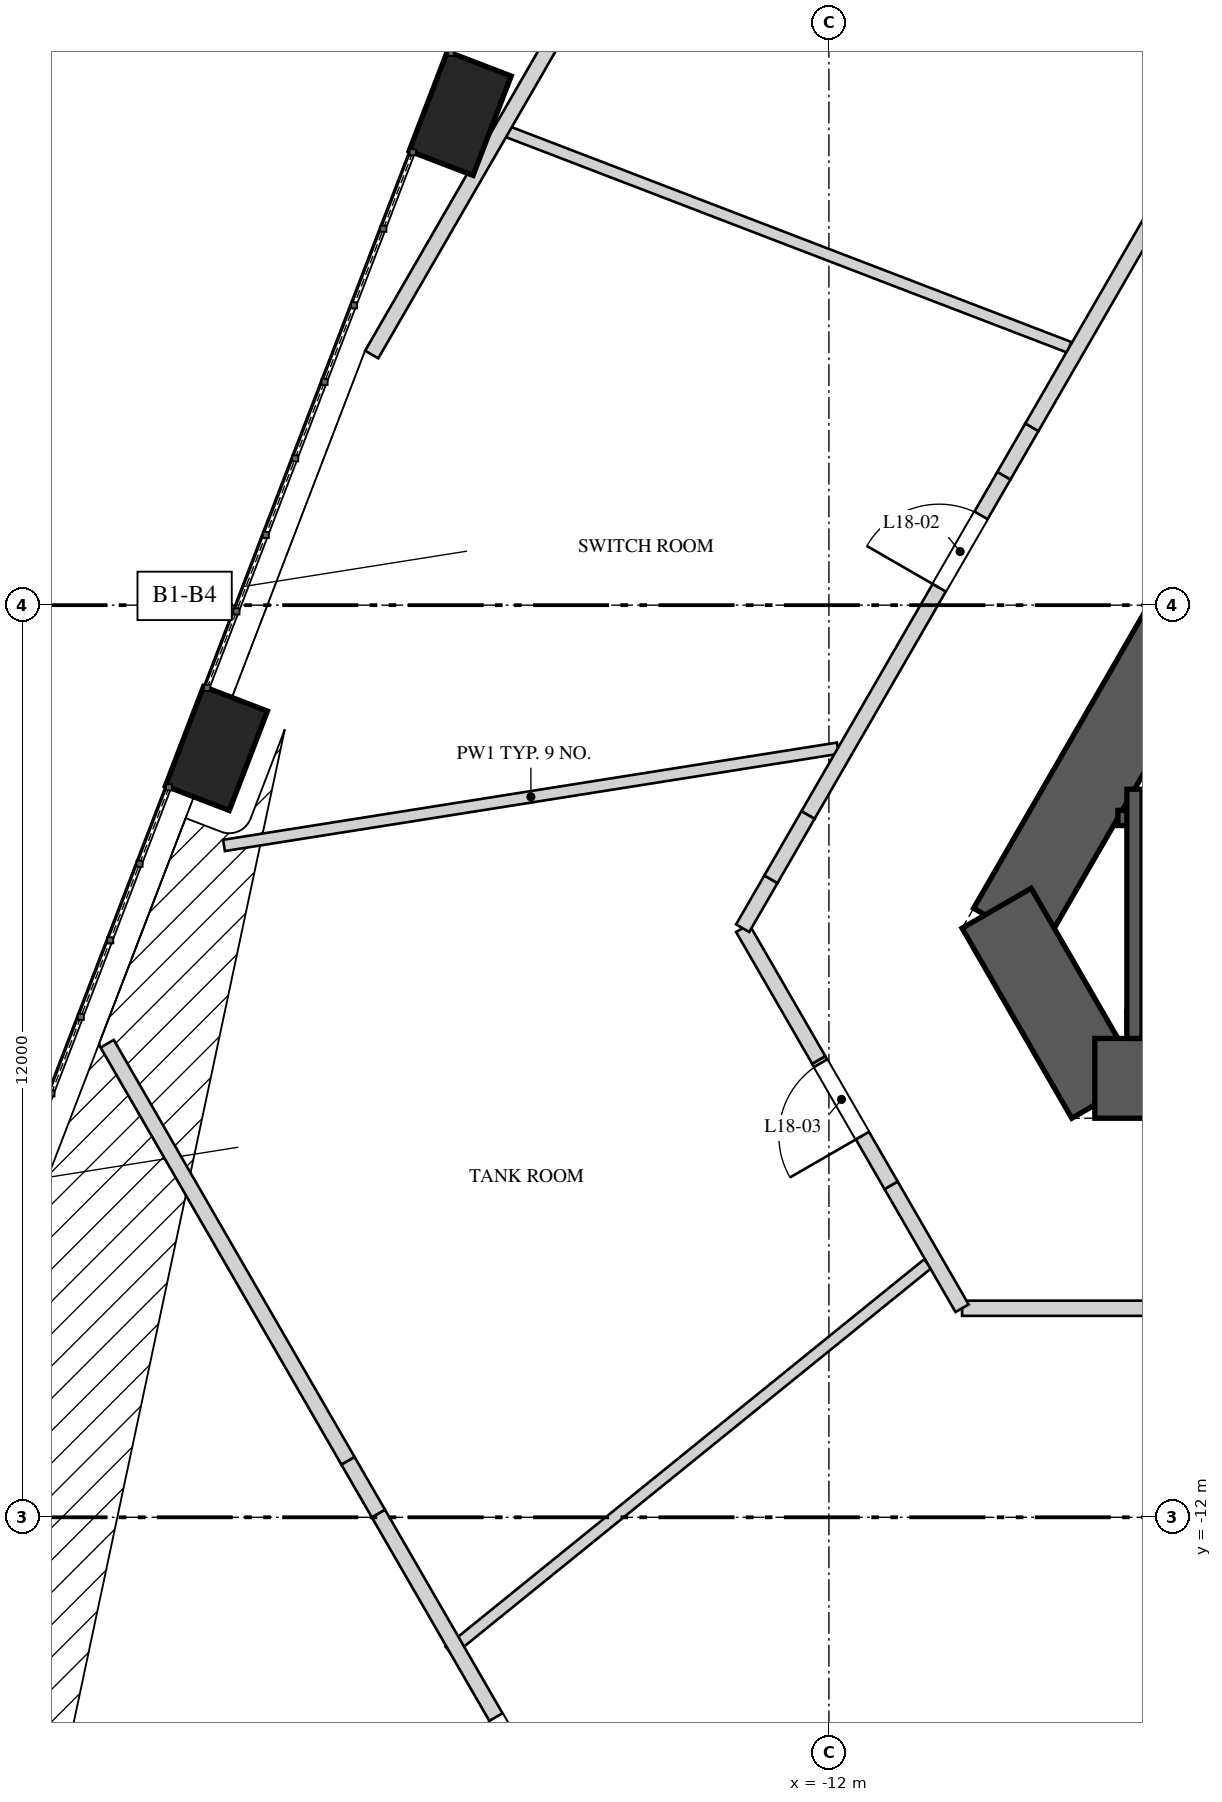
"""IFC4 building model, lengths in metres.
Left out: names, types, materials, properties, quantities, classifications, styles, units other than length and angle.
Written with IfcOpenShell. Run it as: python <this file> out.ifc"""

import sys

from ifc_helpers import new_model, si_unit, direction, frame, frame_2d, origin, origin_2d, place, context, subcontext, project, spatial, polyline, rectangle, outline, extrude, element, fill, save


model = new_model("IFC4")
c1 = context("Model", 3, precision=1e-05, world=origin(), true_north=direction((0.0, 1.0)))
c2 = subcontext(c1, "Body", "Model", "MODEL_VIEW")
j1 = project(units=[si_unit("LENGTHUNIT", "METRE"), si_unit("PLANEANGLEUNIT", "RADIAN")], contexts=[c1])
p1 = place(None, origin())
s1 = spatial("IfcSite", under=j1, at=p1, CompositionType="ELEMENT")
p2 = place(p1, origin())
s2 = spatial("IfcBuilding", under=s1, at=p2, CompositionType="ELEMENT")
p3 = place(p2, frame((0.0, 0.0, 83.2)))
s3 = spatial("IfcBuildingStorey", under=s2, at=p3, CompositionType="ELEMENT", Elevation=83.2)
p4 = place(p3, frame((-1.14, 10.475, 0.0), z_axis=(0.0, 0.0, 1.0), x_axis=(-0.499985955615, -0.866033512162, 0.0)))
e1 = element("IfcWall", 1, at=p4, inside=s3, PredefinedType="SHEAR", context=c2, shape_type="SweptSolid", body=[
    extrude(rectangle(XDim=17.003, YDim=1.05, at=frame_2d((8.501, 0.0))), origin(), (0.0, 0.0, 1.0), 5.2),
])
p5 = place(p4, frame((6.707, 0.0, 0.0)))
e2 = element("IfcOpeningElement", 2, at=p5, cuts=e1, PredefinedType="OPENING", context=c2, shape_type="SweptSolid", body=[
    extrude(rectangle(XDim=1.0, YDim=2.4, at=frame_2d((0.5, 1.2))), frame((0.0, 0.535, 0.0), z_axis=(0.0, -1.0, 0.0), x_axis=(1.0, 0.0, 0.0)), (0.0, 0.0, 1.0), 1.07),
])
p6 = place(p3, frame((-9.793, -3.988, 0.0), z_axis=(0.0, 0.0, 1.0), x_axis=(0.499995765644, -0.866027848477, 0.0)))
e3 = element("IfcWall", 3, at=p6, inside=s3, PredefinedType="SHEAR", context=c2, shape_type="SweptSolid", body=[
    extrude(rectangle(XDim=2.887, YDim=1.05, at=frame_2d((1.443, 0.0))), origin(), (0.0, 0.0, 1.0), 5.2),
])
p7 = place(p3, frame((-8.501, -6.225, 0.0), z_axis=(0.0, 0.0, 1.0), x_axis=(1.0, 0.0, 0.0)))
e4 = element("IfcWall", 4, at=p7, inside=s3, PredefinedType="SHEAR", context=c2, shape_type="SweptSolid", body=[
    extrude(rectangle(XDim=17.003, YDim=1.05, at=frame_2d((8.501, 0.0))), origin(), (0.0, 0.0, 1.0), 5.2),
])
p8 = place(p7, frame((6.707, 0.0, 0.0)))
e5 = element("IfcOpeningElement", 5, at=p8, cuts=e4, PredefinedType="OPENING", context=c2, shape_type="SweptSolid", body=[
    extrude(rectangle(XDim=1.0, YDim=2.4, at=frame_2d((0.5, 1.2))), frame((0.0, 0.535, 0.0), z_axis=(0.0, -1.0, 0.0), x_axis=(1.0, 0.0, 0.0)), (0.0, 0.0, 1.0), 1.07),
])
p9 = place(p7, frame((14.472, 0.0, 0.0)))
e6 = element("IfcOpeningElement", 6, at=p9, cuts=e4, PredefinedType="OPENING", context=c2, shape_type="SweptSolid", body=[
    extrude(rectangle(XDim=0.8, YDim=2.1, at=frame_2d((0.4, 1.05))), frame((0.0, 0.535, 0.0), z_axis=(0.0, -1.0, 0.0), x_axis=(1.0, 0.0, 0.0)), (0.0, 0.0, 1.0), 1.07),
])
for number, where, z_axis, x_axis in (
    (7, (-16.851, 6.469, 0.0), (0.0, 0.0, 1.0), (-0.358, -0.934, 0.0)),
    (8, (-20.058, -1.886, 0.0), (0.0, 0.0, 1.0), (-0.358, -0.934, 0.0)),
):
    element("IfcColumn", number, at=place(p3, frame(where, z_axis=z_axis, x_axis=x_axis)), inside=s3, PredefinedType="COLUMN", context=c2, shape_type="SweptSolid", body=[
        extrude(rectangle(XDim=1.4, YDim=0.9, at=origin_2d()), origin(), (0.0, 0.0, 1.0), 2.864),
    ])
p10 = place(p3, frame((-8.08, -5.475, 0.0), z_axis=(0.0, 0.0, 1.0), x_axis=(1.0, 0.0, 0.0)))
e9 = element("IfcWall", 9, at=p10, inside=s3, PredefinedType="SOLIDWALL", context=c2, shape_type="SweptSolid", body=[
    extrude(rectangle(XDim=6.2, YDim=0.25, at=frame_2d((3.1, 0.0))), origin(), (0.0, 0.0, 1.0), 4.85),
])
p11 = place(p3, frame((-8.198, -2.8, 0.0), z_axis=(0.0, 0.0, 1.0), x_axis=(1.0, 0.0, 0.0)))
e10 = element("IfcWall", 10, at=p11, inside=s3, PredefinedType="SOLIDWALL", context=c2, shape_type="SweptSolid", body=[
    extrude(rectangle(XDim=6.319, YDim=0.2, at=frame_2d((3.159, 0.0))), origin(), (0.0, 0.0, 1.0), 4.85),
])
p12 = place(p3, frame((-7.98, -2.422, 0.0), z_axis=(0.0, 0.0, 1.0), x_axis=(0.0, -1.0, 0.0)))
e11 = element("IfcWall", 11, at=p12, inside=s3, PredefinedType="SOLIDWALL", context=c2, shape_type="SweptSolid", body=[
    extrude(rectangle(XDim=3.278, YDim=0.2, at=frame_2d((1.639, 0.0))), origin(), (0.0, 0.0, 1.0), 4.85),
])
p13 = place(p3, frame((-11.883, -1.882, 0.0), z_axis=(0.0, 0.0, 1.0), x_axis=(-0.987687796789, -0.15643789846, 0.0)))
e12 = element("IfcWall", 12, at=p13, inside=s3, PredefinedType="PARTITIONING", context=c2, shape_type="SweptSolid", body=[
    extrude(rectangle(XDim=8.176, YDim=0.15, at=frame_2d((4.088, 0.0))), origin(), (0.0, 0.0, 1.0), 4.85),
])
p14 = place(p3, frame((-10.701, -8.666, 0.0), z_axis=(0.0, 0.0, 1.0), x_axis=(-0.777155716389, -0.629308344521, 0.0)))
e13 = element("IfcWall", 13, at=p14, inside=s3, PredefinedType="PARTITIONING", context=c2, shape_type="SweptSolid", body=[
    extrude(rectangle(XDim=8.1, YDim=0.15, at=frame_2d((4.05, 0.0))), origin(), (0.0, 0.0, 1.0), 4.85),
])
p15 = place(p3, frame((-8.838, 3.393, 0.0), z_axis=(0.0, 0.0, 1.0), x_axis=(-0.933579605878, 0.358370087324, 0.0)))
e14 = element("IfcWall", 14, at=p15, inside=s3, PredefinedType="PARTITIONING", context=c2, shape_type="SweptSolid", body=[
    extrude(rectangle(XDim=8.033, YDim=0.15, at=frame_2d((4.017, 0.0))), origin(), (0.0, 0.0, 1.0), 4.85),
])
p16 = place(p3, frame((-5.14, -9.25, 0.0), z_axis=(0.0, 0.0, 1.0), x_axis=(-1.0, 0.0, 0.0)))
e15 = element("IfcWall", 15, at=p16, inside=s3, PredefinedType="SOLIDWALL", context=c2, shape_type="SweptSolid", body=[
    extrude(rectangle(XDim=5.108, YDim=0.2, at=frame_2d((2.554, 0.0))), origin(), (0.0, 0.0, 1.0), 4.85),
])
p17 = place(p3, frame((-10.248, -9.25, 0.0), z_axis=(0.0, 0.0, 1.0), x_axis=(-0.499948741277, 0.866054996, 0.0)))
e16 = element("IfcWall", 16, at=p17, inside=s3, PredefinedType="SOLIDWALL", context=c2, shape_type="SweptSolid", body=[
    extrude(rectangle(XDim=1.868, YDim=0.2, at=frame_2d((0.934, 0.0))), origin(), (0.0, 0.0, 1.0), 4.85),
])
p18 = place(p3, frame((-11.182, -7.632, 0.0), z_axis=(0.0, 0.0, 1.0), x_axis=(-0.499999897272, 0.866025463095, 0.0)))
e17 = element("IfcWall", 17, at=p18, inside=s3, PredefinedType="SOLIDWALL", context=c2, shape_type="SweptSolid", body=[
    extrude(outline(polyline([(0.0, 0.0), (1.904, 0.0), (1.905, 4.85), (0.801, 4.85), (0.801, 3.95), (0.0, 3.95), (0.0, 0.0)])), frame((0.0, 0.1, 0.0), z_axis=(0.0, -1.0, 0.0), x_axis=(1.0, 0.0, 0.0)), (0.0, 0.0, 1.0), 0.2),
])
p19 = place(p18, frame((0.754, 0.0, 0.0)))
e18 = element("IfcOpeningElement", 18, at=p19, cuts=e17, PredefinedType="OPENING", context=c2, shape_type="SweptSolid", body=[
    extrude(rectangle(XDim=1.1, YDim=2.2, at=frame_2d((0.55, 1.1))), frame((0.0, 0.11, 0.0), z_axis=(0.0, -1.0, 0.0), x_axis=(1.0, 0.0, 0.0)), (0.0, 0.0, 1.0), 0.22),
])
p20 = place(p3, frame((-12.134, -5.983, 0.0), z_axis=(0.0, 0.0, 1.0), x_axis=(-0.500035721725, 0.866004778855, 0.0)))
e19 = element("IfcWall", 19, at=p20, inside=s3, PredefinedType="SOLIDWALL", context=c2, shape_type="SweptSolid", body=[
    extrude(rectangle(XDim=2.001, YDim=0.2, at=frame_2d((1.0, 0.0))), origin(), (0.0, 0.0, 1.0), 4.85),
])
p21 = place(p3, frame((-13.135, -4.25, 0.0), z_axis=(0.0, 0.0, 1.0), x_axis=(0.499987686533, 0.866032512851, 0.0)))
e20 = element("IfcWall", 20, at=p21, inside=s3, PredefinedType="SOLIDWALL", context=c2, shape_type="SweptSolid", body=[
    extrude(rectangle(XDim=0.744, YDim=0.2, at=frame_2d((0.372, 0.0))), origin(), (0.0, 0.0, 1.0), 4.85),
])
p22 = place(p3, frame((-12.763, -3.606, 0.0), z_axis=(0.0, 0.0, 1.0), x_axis=(0.500061185694, 0.865990075325, 0.0)))
e21 = element("IfcWall", 21, at=p22, inside=s3, PredefinedType="SOLIDWALL", context=c2, shape_type="SweptSolid", body=[
    extrude(rectangle(XDim=0.978, YDim=0.2, at=frame_2d((0.489, 0.0))), origin(), (0.0, 0.0, 1.0), 4.15),
])
p23 = place(p3, frame((-12.274, -2.76, 0.0), z_axis=(0.0, 0.0, 1.0), x_axis=(0.500001317485, 0.866024643133, 0.0)))
e22 = element("IfcWall", 22, at=p23, inside=s3, PredefinedType="SOLIDWALL", context=c2, shape_type="SweptSolid", body=[
    extrude(rectangle(XDim=5.153, YDim=0.2, at=frame_2d((2.577, 0.0))), origin(), (0.0, 0.0, 1.0), 4.85),
])
p24 = place(p23, frame((3.451, 0.0, 0.0)))
e23 = element("IfcOpeningElement", 23, at=p24, cuts=e22, PredefinedType="OPENING", context=c2, shape_type="SweptSolid", body=[
    extrude(rectangle(XDim=1.1, YDim=2.2, at=frame_2d((0.55, 1.1))), frame((0.0, 0.11, 0.0), z_axis=(0.0, -1.0, 0.0), x_axis=(1.0, 0.0, 0.0)), (0.0, 0.0, 1.0), 0.22),
])
p25 = place(p3, frame((-9.698, 1.703, 0.0), z_axis=(0.0, 0.0, 1.0), x_axis=(0.499885169746, 0.866091690913, 0.0)))
e24 = element("IfcWall", 24, at=p25, inside=s3, PredefinedType="SOLIDWALL", context=c2, shape_type="SweptSolid", body=[
    extrude(rectangle(XDim=0.736, YDim=0.2, at=frame_2d((0.368, 0.0))), origin(), (0.0, 0.0, 1.0), 4.15),
])
p26 = place(p3, frame((-9.33, 2.341, 0.0), z_axis=(0.0, 0.0, 1.0), x_axis=(0.500029679218, 0.866008267802, 0.0)))
e25 = element("IfcWall", 25, at=p26, inside=s3, PredefinedType="SOLIDWALL", context=c2, shape_type="SweptSolid", body=[
    extrude(rectangle(XDim=3.577, YDim=0.2, at=frame_2d((1.789, 0.0))), origin(), (0.0, 0.0, 1.0), 4.85),
])
p27 = place(p3, frame((-14.867, -17.25, 0.0), z_axis=(0.0, 0.0, 1.0), x_axis=(-0.499991792115, 0.866030142557, 0.0)))
e26 = element("IfcWall", 26, at=p27, inside=s3, PredefinedType="SOLIDWALL", context=c2, shape_type="SweptSolid", body=[
    extrude(rectangle(XDim=6.12, YDim=0.2, at=frame_2d((3.06, 0.0))), origin(), (0.0, 0.0, 1.0), 4.85),
])
p28 = place(p27, frame((1.427, 0.0, 0.0)))
e27 = element("IfcOpeningElement", 27, at=p28, cuts=e26, PredefinedType="OPENING", context=c2, shape_type="SweptSolid", body=[
    extrude(rectangle(XDim=1.6, YDim=2.3, at=frame_2d((0.8, 1.15))), frame((0.0, 0.11, 0.0), z_axis=(0.0, -1.0, 0.0), x_axis=(1.0, 0.0, 0.0)), (0.0, 0.0, 1.0), 0.22),
])
p29 = place(p3, frame((-17.927, -11.95, 0.0), z_axis=(0.0, 0.0, 1.0), x_axis=(-0.500170954823, 0.865926680471, 0.0)))
e28 = element("IfcWall", 28, at=p29, inside=s3, PredefinedType="SOLIDWALL", context=c2, shape_type="SweptSolid", body=[
    extrude(rectangle(XDim=0.801, YDim=0.2, at=frame_2d((0.4, 0.0))), origin(), (0.0, 0.0, 1.0), 3.95),
])
p30 = place(p3, frame((-18.327, -11.256, 0.0), z_axis=(0.0, 0.0, 1.0), x_axis=(-0.499989308001, 0.866031576725, 0.0)))
e29 = element("IfcWall", 29, at=p30, inside=s3, PredefinedType="SOLIDWALL", context=c2, shape_type="SweptSolid", body=[
    extrude(rectangle(XDim=6.336, YDim=0.2, at=frame_2d((3.168, 0.0))), origin(), (0.0, 0.0, 1.0), 4.85),
])
p31 = place(p3, frame((-18.015, 3.297, 0.0), z_axis=(0.0, 0.0, 1.0), x_axis=(0.500010949126, 0.866019082211, 0.0)))
e30 = element("IfcWall", 30, at=p31, inside=s3, PredefinedType="SOLIDWALL", context=c2, shape_type="SweptSolid", body=[
    extrude(rectangle(XDim=8.253, YDim=0.2, at=frame_2d((4.126, 0.0))), origin(), (0.0, 0.0, 1.0), 4.85),
])
p32 = place(p24, origin())
e31 = element("IfcDoor", 31, at=p32, inside=s3, OperationType="SINGLE_SWING_RIGHT", PredefinedType="DOOR", context=c2, shape_type="SweptSolid", body=[
    extrude(rectangle(XDim=1.1, YDim=2.2, at=frame_2d((0.55, 1.1))), frame((0.0, 0.025, 0.0), z_axis=(0.0, -1.0, 0.0), x_axis=(1.0, 0.0, 0.0)), (0.0, 0.0, 1.0), 0.05),
])
fill(e23, e31)
p33 = place(p19, origin())
e32 = element("IfcDoor", 32, at=p33, inside=s3, OperationType="SINGLE_SWING_LEFT", PredefinedType="DOOR", context=c2, shape_type="SweptSolid", body=[
    extrude(rectangle(XDim=1.1, YDim=2.2, at=frame_2d((0.55, 1.1))), frame((0.0, 0.025, 0.0), z_axis=(0.0, -1.0, 0.0), x_axis=(1.0, 0.0, 0.0)), (0.0, 0.0, 1.0), 0.05),
])
fill(e18, e32)
p34 = place(p28, origin())
e33 = element("IfcDoor", 33, at=p34, inside=s3, OperationType="DOUBLE_DOOR_SINGLE_SWING", PredefinedType="DOOR", context=c2, shape_type="SweptSolid", body=[
    extrude(rectangle(XDim=1.6, YDim=2.3, at=frame_2d((0.8, 1.15))), frame((0.0, 0.025, 0.0), z_axis=(0.0, -1.0, 0.0), x_axis=(1.0, 0.0, 0.0)), (0.0, 0.0, 1.0), 0.05),
])
fill(e27, e33)
save(model, sys.argv[1])
